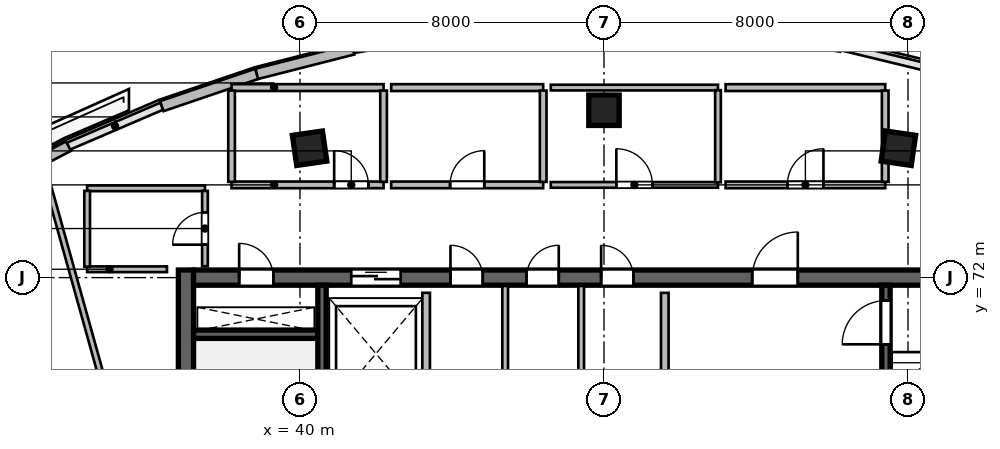
"""IFC4 building model, lengths in metres.
Left out: names, types, materials, properties, quantities, classifications, styles, units other than length and angle.
Written with IfcOpenShell. Run it as: python <this file> out.ifc"""

import sys

from ifc_helpers import new_model, si_unit, direction, frame, frame_2d, origin, origin_2d, place, context, subcontext, project, spatial, rectangle, extrude, source, transform, mapped, element, fill, save


model = new_model("IFC4")
c1 = context("Model", 3, precision=1e-05, world=origin(), true_north=direction((0.0, 1.0)))
c2 = subcontext(c1, "Body", "Model", "MODEL_VIEW")
j1 = project(units=[si_unit("LENGTHUNIT", "METRE"), si_unit("PLANEANGLEUNIT", "RADIAN")], contexts=[c1])
p1 = place(None, origin())
s1 = spatial("IfcSite", under=j1, at=p1, CompositionType="ELEMENT")
p2 = place(p1, origin())
s2 = spatial("IfcBuilding", under=s1, at=p2, CompositionType="ELEMENT")
p3 = place(p2, frame((0.0, 0.0, 275.7)))
s3 = spatial("IfcBuildingStorey", under=s2, at=p3, CompositionType="ELEMENT", Elevation=275.7)
m1 = source(origin(), c2, "Body", "SweptSolid", [
    extrude(rectangle(XDim=12.0, YDim=0.4, at=frame_2d((6.0, 0.0))), origin(), (0.0, 0.0, 1.0), 3.9),
])
p4 = place(p3, frame((37.0, 60.2, 0.0), z_axis=(0.0, 0.0, 1.0), x_axis=(0.0, 1.0, 0.0)))
e1 = element("IfcWall", 1, at=p4, inside=s3, PredefinedType="SHEAR", context=c2, shape_type="MappedRepresentation", body=[
    mapped(m1, transform((0.0, 0.0, 0.0), scale=1.0)),
])
m2 = source(origin(), c2, "Body", "SweptSolid", [
    extrude(rectangle(XDim=21.6, YDim=0.4, at=frame_2d((10.8, 0.0))), origin(), (0.0, 0.0, 1.0), 3.9),
])
p5 = place(p3, frame((37.2, 72.0, 0.0), z_axis=(0.0, 0.0, 1.0), x_axis=(1.0, 0.0, 0.0)))
e2 = element("IfcWall", 2, at=p5, inside=s3, PredefinedType="SHEAR", context=c2, shape_type="MappedRepresentation", body=[
    mapped(m2, transform((0.0, 0.0, 0.0), scale=1.0)),
])
p6 = place(p5, frame((1.2, 0.0, 0.0)))
e3 = element("IfcOpeningElement", 3, at=p6, cuts=e2, PredefinedType="OPENING", context=c2, shape_type="SweptSolid", body=[
    extrude(rectangle(XDim=0.9, YDim=2.1, at=frame_2d((0.45, 1.05))), frame((0.0, 0.21, 0.0), z_axis=(0.0, -1.0, 0.0), x_axis=(1.0, 0.0, 0.0)), (0.0, 0.0, 1.0), 0.42),
])
p7 = place(p5, frame((14.7, 0.0, 0.0)))
e4 = element("IfcOpeningElement", 4, at=p7, cuts=e2, PredefinedType="OPENING", context=c2, shape_type="SweptSolid", body=[
    extrude(rectangle(XDim=1.2, YDim=2.15, at=frame_2d((0.6, 1.075))), frame((0.0, 0.21, 0.0), z_axis=(0.0, -1.0, 0.0), x_axis=(1.0, 0.0, 0.0)), (0.0, 0.0, 1.0), 0.42),
])
p8 = place(p5, frame((4.15, 0.0, 0.0)))
e5 = element("IfcOpeningElement", 5, at=p8, cuts=e2, PredefinedType="OPENING", context=c2, shape_type="SweptSolid", body=[
    extrude(rectangle(XDim=1.3, YDim=2.15, at=frame_2d((0.65, 1.075))), frame((0.0, 0.21, 0.0), z_axis=(0.0, -1.0, 0.0), x_axis=(1.0, 0.0, 0.0)), (0.0, 0.0, 1.0), 0.42),
])
p9 = place(p5, frame((6.76, 0.0, 0.0)))
e6 = element("IfcOpeningElement", 6, at=p9, cuts=e2, PredefinedType="OPENING", context=c2, shape_type="SweptSolid", body=[
    extrude(rectangle(XDim=0.85, YDim=2.1, at=frame_2d((0.425, 1.05))), frame((0.0, 0.21, 0.0), z_axis=(0.0, -1.0, 0.0), x_axis=(1.0, 0.0, 0.0)), (0.0, 0.0, 1.0), 0.42),
])
p10 = place(p5, frame((8.76, 0.0, 0.0)))
e7 = element("IfcOpeningElement", 7, at=p10, cuts=e2, PredefinedType="OPENING", context=c2, shape_type="SweptSolid", body=[
    extrude(rectangle(XDim=0.85, YDim=2.1, at=frame_2d((0.425, 1.05))), frame((0.0, 0.21, 0.0), z_axis=(0.0, -1.0, 0.0), x_axis=(1.0, 0.0, 0.0)), (0.0, 0.0, 1.0), 0.42),
])
p11 = place(p5, frame((10.725, 0.0, 0.0)))
e8 = element("IfcOpeningElement", 8, at=p11, cuts=e2, PredefinedType="OPENING", context=c2, shape_type="SweptSolid", body=[
    extrude(rectangle(XDim=0.85, YDim=2.1, at=frame_2d((0.425, 1.05))), frame((0.0, 0.21, 0.0), z_axis=(0.0, -1.0, 0.0), x_axis=(1.0, 0.0, 0.0)), (0.0, 0.0, 1.0), 0.42),
])
m3 = source(origin(), c2, "Body", "SweptSolid", [
    extrude(rectangle(XDim=3.27, YDim=0.22, at=frame_2d((1.635, 0.0))), origin(), (0.0, 0.0, 1.0), 3.9),
])
p12 = place(p3, frame((37.2, 70.51, 0.0), z_axis=(0.0, 0.0, 1.0), x_axis=(1.0, 0.0, 0.0)))
e9 = element("IfcWall", 9, at=p12, inside=s3, PredefinedType="SHEAR", context=c2, shape_type="MappedRepresentation", body=[
    mapped(m3, transform((0.0, 0.0, 0.0), scale=1.0)),
])
m4 = source(origin(), c2, "Body", "SweptSolid", [
    extrude(rectangle(XDim=11.2, YDim=0.22, at=frame_2d((5.6, 0.0))), origin(), (0.0, 0.0, 1.0), 3.9),
])
p13 = place(p3, frame((40.58, 60.6, 0.0), z_axis=(0.0, 0.0, 1.0), x_axis=(0.0, 1.0, 0.0)))
e10 = element("IfcWall", 10, at=p13, inside=s3, PredefinedType="SHEAR", context=c2, shape_type="MappedRepresentation", body=[
    mapped(m4, transform((0.0, 0.0, 0.0), scale=1.0)),
])
p14 = place(p3, frame((55.42, 60.6, 0.0), z_axis=(0.0, 0.0, 1.0), x_axis=(0.0, 1.0, 0.0)))
e11 = element("IfcWall", 11, at=p14, inside=s3, PredefinedType="SHEAR", context=c2, shape_type="MappedRepresentation", body=[
    mapped(m4, transform((0.0, 0.0, 0.0), scale=1.0)),
])
p15 = place(p14, frame((9.645, 0.0, 0.0)))
e12 = element("IfcOpeningElement", 12, at=p15, cuts=e11, PredefinedType="OPENING", context=c2, shape_type="SweptSolid", body=[
    extrude(rectangle(XDim=1.15, YDim=2.15, at=frame_2d((0.575, 1.075))), frame((0.0, 0.12, 0.0), z_axis=(0.0, -1.0, 0.0), x_axis=(1.0, 0.0, 0.0)), (0.0, 0.0, 1.0), 0.24),
])
m5 = source(origin(), c2, "Body", "SweptSolid", [
    extrude(rectangle(XDim=0.8, YDim=0.8, at=origin_2d()), origin(), (0.0, 0.0, 1.0), 3.9),
])
for number, where, z_axis, x_axis in (
    (13, (40.253, 75.404, 0.0), (0.0, 0.0, 1.0), (-0.143, 0.99, 0.0)),
    (14, (48.0, 76.404, 0.0), (0.0, 0.0, 1.0), (0.0, 1.0, 0.0)),
    (15, (55.747, 75.404, 0.0), (0.0, 0.0, 1.0), (0.143, 0.99, 0.0)),
):
    element("IfcColumn", number, at=place(p3, frame(where, z_axis=z_axis, x_axis=x_axis)), inside=s3, PredefinedType="COLUMN", context=c2, shape_type="MappedRepresentation", body=[
        mapped(m5, transform((0.0, 0.0, 0.0), scale=1.0)),
    ])
m6 = source(origin(), c2, "Body", "SweptSolid", [
    extrude(rectangle(XDim=2.711, YDim=0.28, at=frame_2d((1.356, 0.0))), origin(), (0.0, 0.0, 1.0), 3.64),
])
p16 = place(p3, frame((31.502, 74.205, 0.0), z_axis=(0.0, 0.0, 1.0), x_axis=(0.886828760751, 0.462098202881, 0.0)))
e16 = element("IfcWall", 16, at=p16, inside=s3, PredefinedType="SOLIDWALL", context=c2, shape_type="MappedRepresentation", body=[
    mapped(m6, transform((0.0, 0.0, 0.0), scale=1.0)),
])
m7 = source(origin(), c2, "Body", "SweptSolid", [
    extrude(rectangle(XDim=2.64, YDim=0.28, at=frame_2d((1.32, 0.0))), origin(), (0.0, 0.0, 1.0), 3.64),
])
p17 = place(p3, frame((36.364, 76.511, 0.0), z_axis=(0.0, 0.0, 1.0), x_axis=(0.946685911962, 0.322158011064, 0.0)))
e17 = element("IfcWall", 17, at=p17, inside=s3, PredefinedType="SOLIDWALL", context=c2, shape_type="MappedRepresentation", body=[
    mapped(m7, transform((0.0, 0.0, 0.0), scale=1.0)),
])
m8 = source(origin(), c2, "Body", "SweptSolid", [
    extrude(rectangle(XDim=2.614, YDim=0.28, at=frame_2d((1.307, 0.0))), origin(), (0.0, 0.0, 1.0), 3.64),
])
p18 = place(p3, frame((38.863, 77.362, 0.0), z_axis=(0.0, 0.0, 1.0), x_axis=(0.969106509315, 0.246642602978, 0.0)))
e18 = element("IfcWall", 18, at=p18, inside=s3, PredefinedType="SOLIDWALL", context=c2, shape_type="MappedRepresentation", body=[
    mapped(m8, transform((0.0, 0.0, 0.0), scale=1.0)),
])
m9 = source(origin(), c2, "Body", "SweptSolid", [
    extrude(rectangle(XDim=5.8, YDim=0.2, at=frame_2d((2.9, 0.0))), origin(), (0.0, 0.0, 1.0), 3.64),
])
p19 = place(p3, frame((49.6, 65.8, 0.0), z_axis=(0.0, 0.0, 1.0), x_axis=(0.0, 1.0, 0.0)))
e19 = element("IfcWall", 19, at=p19, inside=s3, PredefinedType="SOLIDWALL", context=c2, shape_type="MappedRepresentation", body=[
    mapped(m9, transform((0.0, 0.0, 0.0), scale=1.0)),
])
m10 = source(origin(), c2, "Body", "SweptSolid", [
    extrude(rectangle(XDim=3.2, YDim=0.2, at=frame_2d((1.6, 0.0))), origin(), (0.0, 0.0, 1.0), 3.64),
])
p20 = place(p3, frame((43.32, 68.4, 0.0), z_axis=(0.0, 0.0, 1.0), x_axis=(0.0, 1.0, 0.0)))
e20 = element("IfcWall", 20, at=p20, inside=s3, PredefinedType="SOLIDWALL", context=c2, shape_type="MappedRepresentation", body=[
    mapped(m10, transform((0.0, 0.0, 0.0), scale=1.0)),
])
m11 = source(origin(), c2, "Body", "SweptSolid", [
    extrude(rectangle(XDim=3.38, YDim=0.15, at=frame_2d((1.69, 0.0))), origin(), (0.0, 0.0, 1.0), 3.64),
])
for number, where, z_axis, x_axis in (
    (21, (45.4, 68.4, 0.0), (0.0, 0.0, 1.0), (0.0, 1.0, 0.0)),
    (22, (47.4, 68.4, 0.0), (0.0, 0.0, 1.0), (0.0, 1.0, 0.0)),
):
    element("IfcWall", number, at=place(p3, frame(where, z_axis=z_axis, x_axis=x_axis)), inside=s3, PredefinedType="PARTITIONING", context=c2, shape_type="MappedRepresentation", body=[
        mapped(m11, transform((0.0, 0.0, 0.0), scale=1.0)),
    ])
m12 = source(origin(), c2, "Body", "SweptSolid", [
    extrude(rectangle(XDim=2.1, YDim=0.15, at=frame_2d((1.05, 0.0))), origin(), (0.0, 0.0, 1.0), 3.64),
])
p21 = place(p3, frame((34.4, 72.22, 0.0), z_axis=(0.0, 0.0, 1.0), x_axis=(1.0, 0.0, 0.0)))
e23 = element("IfcWall", 23, at=p21, inside=s3, PredefinedType="PARTITIONING", context=c2, shape_type="MappedRepresentation", body=[
    mapped(m12, transform((0.0, 0.0, 0.0), scale=1.0)),
])
m13 = source(origin(), c2, "Body", "SweptSolid", [
    extrude(rectangle(XDim=3.1, YDim=0.15, at=frame_2d((1.55, 0.0))), origin(), (0.0, 0.0, 1.0), 3.071),
])
p22 = place(p3, frame((34.4, 74.35, 0.0), z_axis=(0.0, 0.0, 1.0), x_axis=(1.0, 0.0, 0.0)))
e24 = element("IfcWall", 24, at=p22, inside=s3, PredefinedType="PARTITIONING", context=c2, shape_type="MappedRepresentation", body=[
    mapped(m13, transform((0.0, 0.0, 0.0), scale=1.0)),
])
m14 = source(origin(), c2, "Body", "SweptSolid", [
    extrude(rectangle(XDim=1.995, YDim=0.15, at=frame_2d((0.998, 0.0))), origin(), (0.0, 0.0, 1.0), 3.64),
])
p23 = place(p3, frame((34.4, 72.288, 0.0), z_axis=(0.0, 0.0, 1.0), x_axis=(0.0, 1.0, 0.0)))
e25 = element("IfcWall", 25, at=p23, inside=s3, PredefinedType="PARTITIONING", context=c2, shape_type="MappedRepresentation", body=[
    mapped(m14, transform((0.0, 0.0, 0.0), scale=1.0)),
])
m15 = source(origin(), c2, "Body", "SweptSolid", [
    extrude(rectangle(XDim=1.982, YDim=0.15, at=frame_2d((0.991, 0.0))), origin(), (0.0, 0.0, 1.0), 3.64),
])
p24 = place(p3, frame((37.5, 72.3, 0.0), z_axis=(0.0, 0.0, 1.0), x_axis=(0.0, 1.0, 0.0)))
e26 = element("IfcWall", 26, at=p24, inside=s3, PredefinedType="PARTITIONING", context=c2, shape_type="MappedRepresentation", body=[
    mapped(m15, transform((0.0, 0.0, 0.0), scale=1.0)),
])
p25 = place(p24, frame((0.566, 0.0, 0.0)))
e27 = element("IfcOpeningElement", 27, at=p25, cuts=e26, PredefinedType="OPENING", context=c2, shape_type="SweptSolid", body=[
    extrude(rectangle(XDim=0.85, YDim=2.1, at=frame_2d((0.425, 1.05))), frame((0.0, 0.085, 0.0), z_axis=(0.0, -1.0, 0.0), x_axis=(1.0, 0.0, 0.0)), (0.0, 0.0, 1.0), 0.17),
])
m16 = source(origin(), c2, "Body", "SweptSolid", [
    extrude(rectangle(XDim=4.0, YDim=0.175, at=frame_2d((2.0, 0.0))), origin(), (0.0, 0.0, 1.0), 3.64),
])
p26 = place(p3, frame((38.2, 74.44, 0.0), z_axis=(0.0, 0.0, 1.0), x_axis=(1.0, 0.0, 0.0)))
e28 = element("IfcWall", 28, at=p26, inside=s3, PredefinedType="PARTITIONING", context=c2, shape_type="MappedRepresentation", body=[
    mapped(m16, transform((0.0, 0.0, 0.0), scale=1.0)),
])
p27 = place(p26, frame((2.7, 0.0, 0.0)))
e29 = element("IfcOpeningElement", 29, at=p27, cuts=e28, PredefinedType="OPENING", context=c2, shape_type="SweptSolid", body=[
    extrude(rectangle(XDim=0.9, YDim=2.08, at=frame_2d((0.45, 1.04))), frame((0.0, 0.098, 0.0), z_axis=(0.0, -1.0, 0.0), x_axis=(1.0, 0.0, 0.0)), (0.0, 0.0, 1.0), 0.195),
])
m17 = source(origin(), c2, "Body", "SweptSolid", [
    extrude(rectangle(XDim=4.0, YDim=0.18, at=frame_2d((2.0, 0.0))), origin(), (0.0, 0.0, 1.0), 3.64),
])
p28 = place(p3, frame((38.2, 77.0, 0.0), z_axis=(0.0, 0.0, 1.0), x_axis=(1.0, 0.0, 0.0)))
e30 = element("IfcWall", 30, at=p28, inside=s3, PredefinedType="PLUMBINGWALL", context=c2, shape_type="MappedRepresentation", body=[
    mapped(m17, transform((0.0, 0.0, 0.0), scale=1.0)),
])
m18 = source(origin(), c2, "Body", "SweptSolid", [
    extrude(rectangle(XDim=2.403, YDim=0.175, at=frame_2d((1.201, 0.0))), origin(), (0.0, 0.0, 1.0), 3.64),
])
for number, where, z_axis, x_axis in (
    (31, (38.2, 74.519, 0.0), (0.0, 0.0, 1.0), (0.0, 1.0, 0.0)),
    (32, (42.2, 74.519, 0.0), (0.0, 0.0, 1.0), (0.0, 1.0, 0.0)),
):
    element("IfcWall", number, at=place(p3, frame(where, z_axis=z_axis, x_axis=x_axis)), inside=s3, PredefinedType="PARTITIONING", context=c2, shape_type="MappedRepresentation", body=[
        mapped(m18, transform((0.0, 0.0, 0.0), scale=1.0)),
    ])
p29 = place(p3, frame((42.4, 74.44, 0.0), z_axis=(0.0, 0.0, 1.0), x_axis=(1.0, 0.0, 0.0)))
e33 = element("IfcWall", 33, at=p29, inside=s3, PredefinedType="PARTITIONING", context=c2, shape_type="MappedRepresentation", body=[
    mapped(m16, transform((0.0, 0.0, 0.0), scale=1.0)),
])
p30 = place(p29, frame((1.55, 0.0, 0.0)))
e34 = element("IfcOpeningElement", 34, at=p30, cuts=e33, PredefinedType="OPENING", context=c2, shape_type="SweptSolid", body=[
    extrude(rectangle(XDim=0.9, YDim=2.08, at=frame_2d((0.45, 1.04))), frame((0.0, 0.098, 0.0), z_axis=(0.0, -1.0, 0.0), x_axis=(1.0, 0.0, 0.0)), (0.0, 0.0, 1.0), 0.195),
])
p31 = place(p3, frame((42.4, 77.0, 0.0), z_axis=(0.0, 0.0, 1.0), x_axis=(1.0, 0.0, 0.0)))
e35 = element("IfcWall", 35, at=p31, inside=s3, PredefinedType="PLUMBINGWALL", context=c2, shape_type="MappedRepresentation", body=[
    mapped(m17, transform((0.0, 0.0, 0.0), scale=1.0)),
])
p32 = place(p3, frame((46.4, 74.519, 0.0), z_axis=(0.0, 0.0, 1.0), x_axis=(0.0, 1.0, 0.0)))
e36 = element("IfcWall", 36, at=p32, inside=s3, PredefinedType="PARTITIONING", context=c2, shape_type="MappedRepresentation", body=[
    mapped(m18, transform((0.0, 0.0, 0.0), scale=1.0)),
])
m19 = source(origin(), c2, "Body", "SweptSolid", [
    extrude(rectangle(XDim=4.4, YDim=0.15, at=frame_2d((2.2, 0.0))), origin(), (0.0, 0.0, 1.0), 3.64),
])
p33 = place(p3, frame((46.6, 74.44, 0.0), z_axis=(0.0, 0.0, 1.0), x_axis=(1.0, 0.0, 0.0)))
e37 = element("IfcWall", 37, at=p33, inside=s3, PredefinedType="PARTITIONING", context=c2, shape_type="MappedRepresentation", body=[
    mapped(m19, transform((0.0, 0.0, 0.0), scale=1.0)),
])
p34 = place(p33, frame((1.725, 0.0, 0.0)))
e38 = element("IfcOpeningElement", 38, at=p34, cuts=e37, PredefinedType="OPENING", context=c2, shape_type="SweptSolid", body=[
    extrude(rectangle(XDim=0.95, YDim=2.1, at=frame_2d((0.475, 1.05))), frame((0.0, 0.085, 0.0), z_axis=(0.0, -1.0, 0.0), x_axis=(1.0, 0.0, 0.0)), (0.0, 0.0, 1.0), 0.17),
])
p35 = place(p3, frame((46.6, 77.0, 0.0), z_axis=(0.0, 0.0, 1.0), x_axis=(1.0, 0.0, 0.0)))
e39 = element("IfcWall", 39, at=p35, inside=s3, PredefinedType="PARTITIONING", context=c2, shape_type="MappedRepresentation", body=[
    mapped(m19, transform((0.0, 0.0, 0.0), scale=1.0)),
])
m20 = source(origin(), c2, "Body", "SweptSolid", [
    extrude(rectangle(XDim=2.425, YDim=0.15, at=frame_2d((1.212, 0.0))), origin(), (0.0, 0.0, 1.0), 3.64),
])
p36 = place(p3, frame((51.0, 74.508, 0.0), z_axis=(0.0, 0.0, 1.0), x_axis=(0.0, 1.0, 0.0)))
e40 = element("IfcWall", 40, at=p36, inside=s3, PredefinedType="PARTITIONING", context=c2, shape_type="MappedRepresentation", body=[
    mapped(m20, transform((0.0, 0.0, 0.0), scale=1.0)),
])
m21 = source(origin(), c2, "Body", "SweptSolid", [
    extrude(rectangle(XDim=4.2, YDim=0.175, at=frame_2d((2.1, 0.0))), origin(), (0.0, 0.0, 1.0), 3.64),
])
p37 = place(p3, frame((51.2, 74.44, 0.0), z_axis=(0.0, 0.0, 1.0), x_axis=(1.0, 0.0, 0.0)))
e41 = element("IfcWall", 41, at=p37, inside=s3, PredefinedType="PARTITIONING", context=c2, shape_type="MappedRepresentation", body=[
    mapped(m21, transform((0.0, 0.0, 0.0), scale=1.0)),
])
p38 = place(p37, frame((1.625, 0.0, 0.0)))
e42 = element("IfcOpeningElement", 42, at=p38, cuts=e41, PredefinedType="OPENING", context=c2, shape_type="SweptSolid", body=[
    extrude(rectangle(XDim=0.95, YDim=2.12, at=frame_2d((0.475, 1.06))), frame((0.0, 0.098, 0.0), z_axis=(0.0, -1.0, 0.0), x_axis=(1.0, 0.0, 0.0)), (0.0, 0.0, 1.0), 0.195),
])
m22 = source(origin(), c2, "Body", "SweptSolid", [
    extrude(rectangle(XDim=4.2, YDim=0.18, at=frame_2d((2.1, 0.0))), origin(), (0.0, 0.0, 1.0), 3.64),
])
p39 = place(p3, frame((51.2, 77.0, 0.0), z_axis=(0.0, 0.0, 1.0), x_axis=(1.0, 0.0, 0.0)))
e43 = element("IfcWall", 43, at=p39, inside=s3, PredefinedType="PLUMBINGWALL", context=c2, shape_type="MappedRepresentation", body=[
    mapped(m22, transform((0.0, 0.0, 0.0), scale=1.0)),
])
p40 = place(p3, frame((55.4, 74.519, 0.0), z_axis=(0.0, 0.0, 1.0), x_axis=(0.0, 1.0, 0.0)))
e44 = element("IfcWall", 44, at=p40, inside=s3, PredefinedType="PARTITIONING", context=c2, shape_type="MappedRepresentation", body=[
    mapped(m18, transform((0.0, 0.0, 0.0), scale=1.0)),
])
m23 = source(origin(), c2, "Body", "SweptSolid", [
    extrude(rectangle(XDim=17.556, YDim=0.15, at=frame_2d((8.778, 0.0))), origin(), (0.0, 0.0, 1.0), 3.64),
])
p41 = place(p3, frame((33.8, 54.958, 0.0), z_axis=(0.0, 0.0, 1.0), x_axis=(-0.395687598313, 0.918385172213, 0.0)))
e45 = element("IfcWall", 45, at=p41, inside=s3, PredefinedType="PARTITIONING", context=c2, shape_type="MappedRepresentation", body=[
    mapped(m23, transform((0.0, 0.0, 0.0), scale=1.0)),
])
m24 = source(origin(), c2, "Body", "SweptSolid", [
    extrude(rectangle(XDim=12.311, YDim=0.15, at=frame_2d((6.155, 0.0))), origin(), (0.0, 0.0, 1.0), 3.64),
])
p42 = place(p3, frame((36.5, 63.216, 0.0), z_axis=(0.0, 0.0, 1.0), x_axis=(-0.268759602651, 0.963207286093, 0.0)))
e46 = element("IfcWall", 46, at=p42, inside=s3, PredefinedType="PARTITIONING", context=c2, shape_type="MappedRepresentation", body=[
    mapped(m24, transform((0.0, 0.0, 0.0), scale=1.0)),
])
m25 = source(origin(), c2, "Body", "SweptSolid", [
    extrude(rectangle(XDim=0.9, YDim=2.1, at=frame_2d((0.45, 1.05))), frame((0.0, 0.025, 0.0), z_axis=(0.0, -1.0, 0.0), x_axis=(1.0, 0.0, 0.0)), (0.0, 0.0, 1.0), 0.05),
])
p43 = place(p6, origin())
e47 = element("IfcDoor", 47, at=p43, inside=s3, OperationType="SINGLE_SWING_LEFT", PredefinedType="DOOR", context=c2, shape_type="MappedRepresentation", body=[
    mapped(m25, transform((0.0, 0.0, 0.0), scale=1.0)),
])
fill(e3, e47)
m26 = source(origin(), c2, "Body", "SweptSolid", [
    extrude(rectangle(XDim=1.15, YDim=2.15, at=frame_2d((0.575, 1.075))), frame((0.0, 0.025, 0.0), z_axis=(0.0, -1.0, 0.0), x_axis=(1.0, 0.0, 0.0)), (0.0, 0.0, 1.0), 0.05),
])
p44 = place(p15, origin())
e48 = element("IfcDoor", 48, at=p44, inside=s3, OperationType="SINGLE_SWING_LEFT", PredefinedType="DOOR", context=c2, shape_type="MappedRepresentation", body=[
    mapped(m26, transform((0.0, 0.0, 0.0), scale=1.0)),
])
fill(e12, e48)
m27 = source(origin(), c2, "Body", "SweptSolid", [
    extrude(rectangle(XDim=1.2, YDim=2.15, at=frame_2d((0.6, 1.075))), frame((0.0, 0.025, 0.0), z_axis=(0.0, -1.0, 0.0), x_axis=(1.0, 0.0, 0.0)), (0.0, 0.0, 1.0), 0.05),
])
p45 = place(p7, origin())
e49 = element("IfcDoor", 49, at=p45, inside=s3, OperationType="SINGLE_SWING_RIGHT", PredefinedType="DOOR", context=c2, shape_type="MappedRepresentation", body=[
    mapped(m27, transform((0.0, 0.0, 0.0), scale=1.0)),
])
fill(e4, e49)
m28 = source(origin(), c2, "Body", "SweptSolid", [
    extrude(rectangle(XDim=1.3, YDim=2.15, at=frame_2d((0.65, 1.075))), frame((0.0, 0.025, 0.0), z_axis=(0.0, -1.0, 0.0), x_axis=(1.0, 0.0, 0.0)), (0.0, 0.0, 1.0), 0.05),
])
p46 = place(p8, origin())
e50 = element("IfcDoor", 50, at=p46, inside=s3, OperationType="DOUBLE_DOOR_SLIDING", PredefinedType="DOOR", context=c2, shape_type="MappedRepresentation", body=[
    mapped(m28, transform((0.0, 0.0, 0.0), scale=1.0)),
])
fill(e5, e50)
m29 = source(origin(), c2, "Body", "SweptSolid", [
    extrude(rectangle(XDim=0.85, YDim=2.1, at=frame_2d((0.425, 1.05))), frame((0.0, 0.025, 0.0), z_axis=(0.0, -1.0, 0.0), x_axis=(1.0, 0.0, 0.0)), (0.0, 0.0, 1.0), 0.05),
])
p47 = place(p9, origin())
e51 = element("IfcDoor", 51, at=p47, inside=s3, OperationType="SINGLE_SWING_LEFT", PredefinedType="DOOR", context=c2, shape_type="MappedRepresentation", body=[
    mapped(m29, transform((0.0, 0.0, 0.0), scale=1.0)),
])
fill(e6, e51)
p48 = place(p10, origin())
e52 = element("IfcDoor", 52, at=p48, inside=s3, OperationType="SINGLE_SWING_RIGHT", PredefinedType="DOOR", context=c2, shape_type="MappedRepresentation", body=[
    mapped(m29, transform((0.0, 0.0, 0.0), scale=1.0)),
])
fill(e7, e52)
p49 = place(p11, origin())
e53 = element("IfcDoor", 53, at=p49, inside=s3, OperationType="SINGLE_SWING_LEFT", PredefinedType="DOOR", context=c2, shape_type="MappedRepresentation", body=[
    mapped(m29, transform((0.0, 0.0, 0.0), scale=1.0)),
])
fill(e8, e53)
p50 = place(p25, origin())
e54 = element("IfcDoor", 54, at=p50, inside=s3, OperationType="SINGLE_SWING_LEFT", PredefinedType="DOOR", context=c2, shape_type="MappedRepresentation", body=[
    mapped(m29, transform((0.0, 0.0, 0.0), scale=1.0)),
])
fill(e27, e54)
m30 = source(origin(), c2, "Body", "SweptSolid", [
    extrude(rectangle(XDim=0.9, YDim=2.08, at=frame_2d((0.45, 1.04))), frame((0.0, 0.025, 0.0), z_axis=(0.0, -1.0, 0.0), x_axis=(1.0, 0.0, 0.0)), (0.0, 0.0, 1.0), 0.05),
])
p51 = place(p27, origin())
e55 = element("IfcDoor", 55, at=p51, inside=s3, OperationType="SINGLE_SWING_LEFT", PredefinedType="DOOR", context=c2, shape_type="MappedRepresentation", body=[
    mapped(m30, transform((0.0, 0.0, 0.0), scale=1.0)),
])
fill(e29, e55)
p52 = place(p30, origin())
e56 = element("IfcDoor", 56, at=p52, inside=s3, OperationType="SINGLE_SWING_RIGHT", PredefinedType="DOOR", context=c2, shape_type="MappedRepresentation", body=[
    mapped(m30, transform((0.0, 0.0, 0.0), scale=1.0)),
])
fill(e34, e56)
m31 = source(origin(), c2, "Body", "SweptSolid", [
    extrude(rectangle(XDim=0.95, YDim=2.1, at=frame_2d((0.475, 1.05))), frame((0.0, 0.025, 0.0), z_axis=(0.0, -1.0, 0.0), x_axis=(1.0, 0.0, 0.0)), (0.0, 0.0, 1.0), 0.05),
])
p53 = place(p34, origin())
e57 = element("IfcDoor", 57, at=p53, inside=s3, OperationType="SINGLE_SWING_LEFT", PredefinedType="DOOR", context=c2, shape_type="MappedRepresentation", body=[
    mapped(m31, transform((0.0, 0.0, 0.0), scale=1.0)),
])
fill(e38, e57)
m32 = source(origin(), c2, "Body", "SweptSolid", [
    extrude(rectangle(XDim=0.95, YDim=2.12, at=frame_2d((0.475, 1.06))), frame((0.0, 0.025, 0.0), z_axis=(0.0, -1.0, 0.0), x_axis=(1.0, 0.0, 0.0)), (0.0, 0.0, 1.0), 0.05),
])
p54 = place(p38, origin())
e58 = element("IfcDoor", 58, at=p54, inside=s3, OperationType="SINGLE_SWING_RIGHT", PredefinedType="DOOR", context=c2, shape_type="MappedRepresentation", body=[
    mapped(m32, transform((0.0, 0.0, 0.0), scale=1.0)),
])
fill(e42, e58)
save(model, sys.argv[1])
